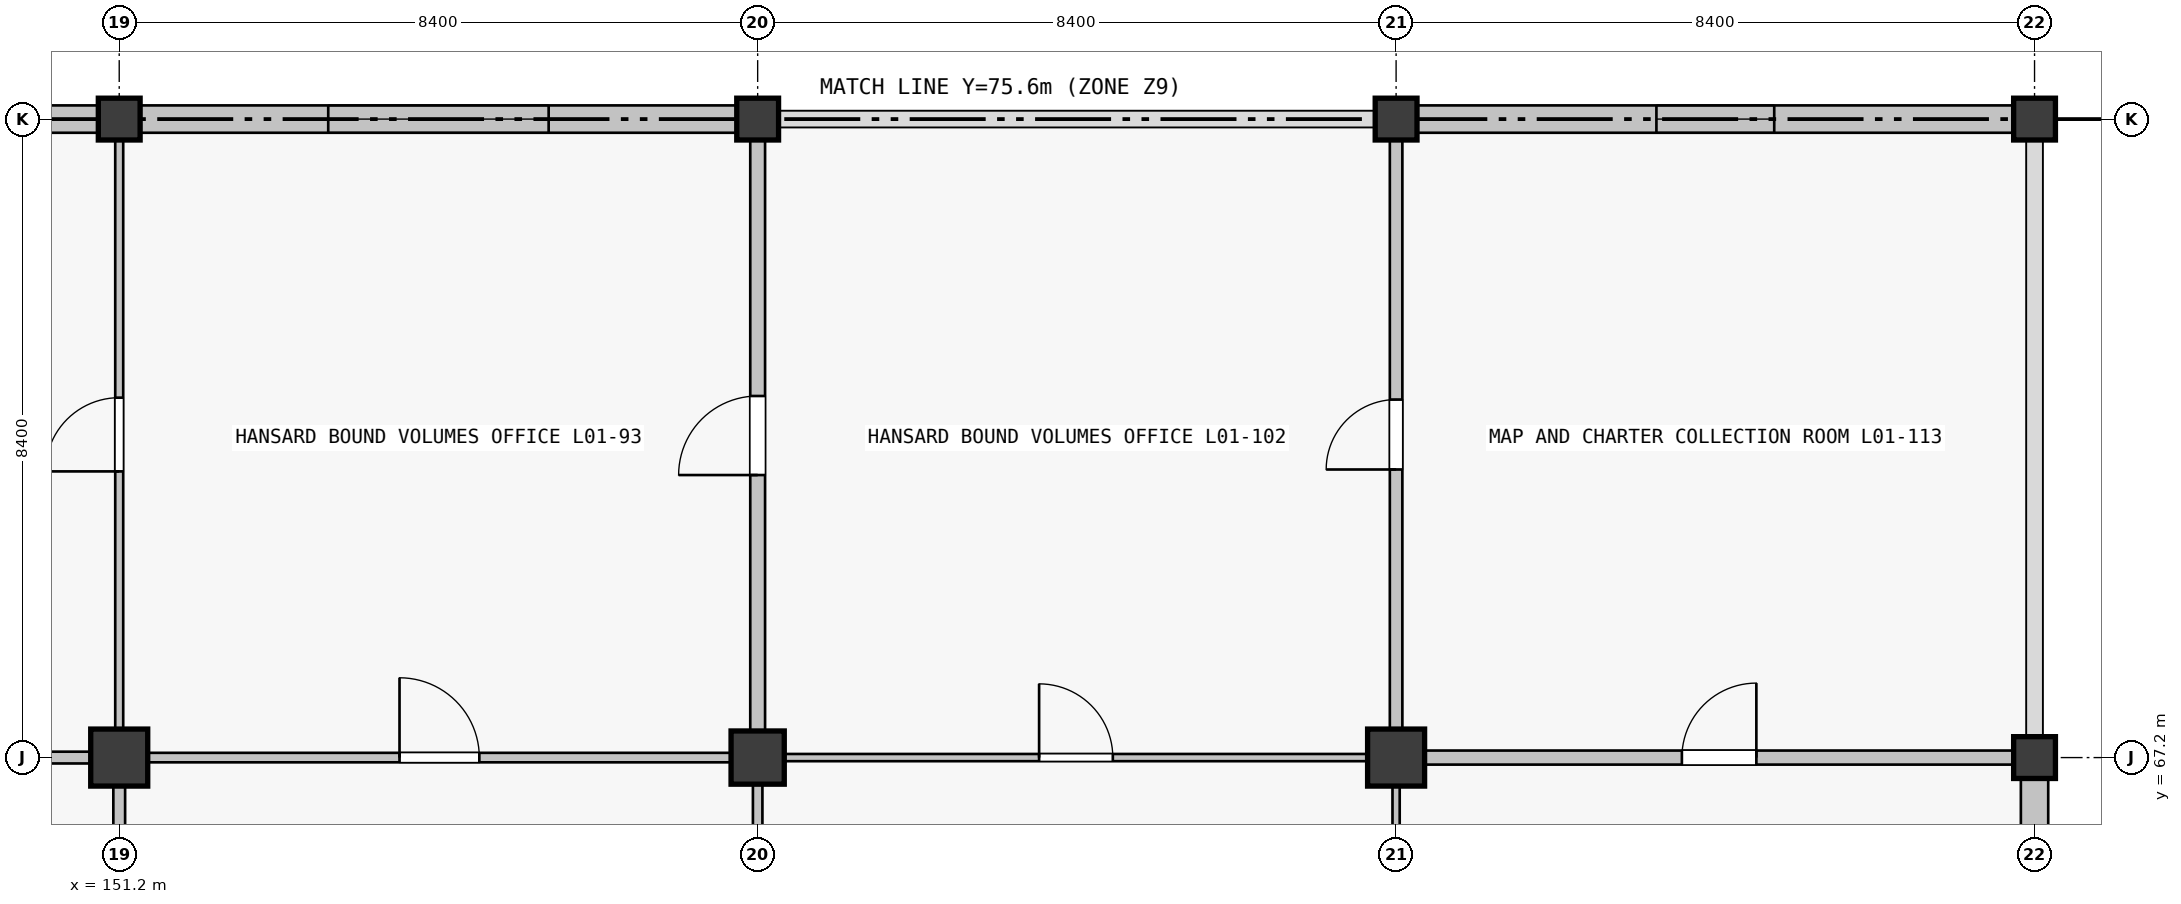
"""IFC4 building model, lengths in metres.
Left out: names, types, materials, properties, quantities, classifications, styles, units other than length and angle.
Written with IfcOpenShell. Run it as: python <this file> out.ifc"""

import sys

from ifc_helpers import new_model, si_unit, direction, frame, frame_2d, origin, origin_2d, place, context, subcontext, project, spatial, rectangle, extrude, element, fill, save


model = new_model("IFC4")
c1 = context("Model", 3, precision=1e-05, world=origin(), true_north=direction((0.0, 1.0)))
c2 = subcontext(c1, "Body", "Model", "MODEL_VIEW")
j1 = project(units=[si_unit("LENGTHUNIT", "METRE"), si_unit("PLANEANGLEUNIT", "RADIAN")], contexts=[c1])
p1 = place(None, origin())
s1 = spatial("IfcSite", under=j1, at=p1, CompositionType="ELEMENT")
p2 = place(p1, origin())
s2 = spatial("IfcBuilding", under=s1, at=p2, CompositionType="ELEMENT")
p3 = place(p2, frame((0.0, 0.0, 5.76)))
s3 = spatial("IfcBuildingStorey", under=s2, at=p3, CompositionType="ELEMENT", Elevation=5.76)
p4 = place(p3, frame((151.2, 67.2, 0.0), z_axis=(0.0, 0.0, 1.0), x_axis=(1.0, 0.0, 0.0)))
e1 = element("IfcColumn", 1, at=p4, inside=s3, PredefinedType="COLUMN", context=c2, shape_type="SweptSolid", body=[
    extrude(rectangle(XDim=0.75, YDim=0.75, at=origin_2d()), origin(), (0.0, 0.0, 1.0), 4.5),
])
p5 = place(p3, frame((151.2, 75.6, 0.0), z_axis=(0.0, 0.0, 1.0), x_axis=(1.0, 0.0, 0.0)))
e2 = element("IfcColumn", 2, at=p5, inside=s3, PredefinedType="COLUMN", context=c2, shape_type="SweptSolid", body=[
    extrude(rectangle(XDim=0.55, YDim=0.55, at=origin_2d()), origin(), (0.0, 0.0, 1.0), 4.2),
])
p6 = place(p3, frame((159.6, 67.2, 0.0), z_axis=(0.0, 0.0, 1.0), x_axis=(1.0, 0.0, 0.0)))
e3 = element("IfcColumn", 3, at=p6, inside=s3, PredefinedType="COLUMN", context=c2, shape_type="SweptSolid", body=[
    extrude(rectangle(XDim=0.7, YDim=0.7, at=origin_2d()), origin(), (0.0, 0.0, 1.0), 4.5),
])
p7 = place(p3, frame((159.6, 75.6, 0.0), z_axis=(0.0, 0.0, 1.0), x_axis=(1.0, 0.0, 0.0)))
e4 = element("IfcColumn", 4, at=p7, inside=s3, PredefinedType="COLUMN", context=c2, shape_type="SweptSolid", body=[
    extrude(rectangle(XDim=0.55, YDim=0.55, at=origin_2d()), origin(), (0.0, 0.0, 1.0), 4.2),
])
p8 = place(p3, frame((168.0, 67.2, 0.0), z_axis=(0.0, 0.0, 1.0), x_axis=(1.0, 0.0, 0.0)))
e5 = element("IfcColumn", 5, at=p8, inside=s3, PredefinedType="COLUMN", context=c2, shape_type="SweptSolid", body=[
    extrude(rectangle(XDim=0.75, YDim=0.75, at=origin_2d()), origin(), (0.0, 0.0, 1.0), 4.5),
])
for number, where, z_axis, x_axis in (
    (6, (168.0, 75.6, 0.0), (0.0, 0.0, 1.0), (1.0, 0.0, 0.0)),
    (7, (176.4, 67.2, 0.0), (0.0, 0.0, 1.0), (1.0, 0.0, 0.0)),
    (8, (176.4, 75.6, 0.0), (0.0, 0.0, 1.0), (1.0, 0.0, 0.0)),
):
    element("IfcColumn", number, at=place(p3, frame(where, z_axis=z_axis, x_axis=x_axis)), inside=s3, PredefinedType="COLUMN", context=c2, shape_type="SweptSolid", body=[
        extrude(rectangle(XDim=0.55, YDim=0.55, at=origin_2d()), origin(), (0.0, 0.0, 1.0), 4.2),
    ])
p9 = place(p3, frame((143.076, 75.6, 0.0), z_axis=(0.0, 0.0, 1.0), x_axis=(1.0, 0.0, 0.0)))
e9 = element("IfcWall", 9, at=p9, inside=s3, PredefinedType="SOLIDWALL", context=c2, shape_type="SweptSolid", body=[
    extrude(rectangle(XDim=7.848, YDim=0.36, at=frame_2d((3.924, 0.0))), origin(), (0.0, 0.0, 1.0), 3.4),
])
p10 = place(p9, frame((2.774, 0.0, 0.9)))
e10 = element("IfcOpeningElement", 10, at=p10, cuts=e9, PredefinedType="OPENING", context=c2, shape_type="SweptSolid", body=[
    extrude(rectangle(XDim=2.3, YDim=1.85, at=frame_2d((1.15, 0.925))), frame((0.0, 0.18, 0.0), z_axis=(0.0, -1.0, 0.0), x_axis=(1.0, 0.0, 0.0)), (0.0, 0.0, 1.0), 0.36),
])
p11 = place(p3, frame((151.476, 75.6, 0.0), z_axis=(0.0, 0.0, 1.0), x_axis=(1.0, 0.0, 0.0)))
e11 = element("IfcWall", 11, at=p11, inside=s3, PredefinedType="SOLIDWALL", context=c2, shape_type="SweptSolid", body=[
    extrude(rectangle(XDim=7.848, YDim=0.36, at=frame_2d((3.924, 0.0))), origin(), (0.0, 0.0, 1.0), 3.4),
])
p12 = place(p11, frame((2.474, 0.0, 0.9)))
e12 = element("IfcOpeningElement", 12, at=p12, cuts=e11, PredefinedType="OPENING", context=c2, shape_type="SweptSolid", body=[
    extrude(rectangle(XDim=2.9, YDim=1.85, at=frame_2d((1.45, 0.925))), frame((0.0, 0.18, 0.0), z_axis=(0.0, -1.0, 0.0), x_axis=(1.0, 0.0, 0.0)), (0.0, 0.0, 1.0), 0.36),
])
p13 = place(p3, frame((176.4, 66.924, 0.0), z_axis=(0.0, 0.0, 1.0), x_axis=(0.0, -1.0, 0.0)))
e13 = element("IfcWall", 13, at=p13, inside=s3, PredefinedType="SOLIDWALL", context=c2, shape_type="SweptSolid", body=[
    extrude(rectangle(XDim=7.848, YDim=0.36, at=frame_2d((3.924, 0.0))), origin(), (0.0, 0.0, 1.0), 3.4),
])
p14 = place(p13, frame((2.549, 0.0, 0.9)))
e14 = element("IfcOpeningElement", 14, at=p14, cuts=e13, PredefinedType="OPENING", context=c2, shape_type="SweptSolid", body=[
    extrude(rectangle(XDim=2.75, YDim=1.6, at=frame_2d((1.375, 0.8))), frame((0.0, 0.18, 0.0), z_axis=(0.0, -1.0, 0.0), x_axis=(1.0, 0.0, 0.0)), (0.0, 0.0, 1.0), 0.36),
])
p15 = place(p3, frame((168.276, 75.6, 0.0), z_axis=(0.0, 0.0, 1.0), x_axis=(1.0, 0.0, 0.0)))
e15 = element("IfcWall", 15, at=p15, inside=s3, PredefinedType="SOLIDWALL", context=c2, shape_type="SweptSolid", body=[
    extrude(rectangle(XDim=7.848, YDim=0.36, at=frame_2d((3.924, 0.0))), origin(), (0.0, 0.0, 1.0), 3.4),
])
p16 = place(p15, frame((3.149, 0.0, 0.9)))
e16 = element("IfcOpeningElement", 16, at=p16, cuts=e15, PredefinedType="OPENING", context=c2, shape_type="SweptSolid", body=[
    extrude(rectangle(XDim=1.55, YDim=1.6, at=frame_2d((0.775, 0.8))), frame((0.0, 0.18, 0.0), z_axis=(0.0, -1.0, 0.0), x_axis=(1.0, 0.0, 0.0)), (0.0, 0.0, 1.0), 0.36),
])
p17 = place(p3, frame((143.152, 67.2, 0.0), z_axis=(0.0, 0.0, 1.0), x_axis=(1.0, 0.0, 0.0)))
e17 = element("IfcWall", 17, at=p17, inside=s3, PredefinedType="PARTITIONING", context=c2, shape_type="SweptSolid", body=[
    extrude(rectangle(XDim=7.671, YDim=0.155, at=frame_2d((3.835, 0.0))), origin(), (0.0, 0.0, 1.0), 2.4),
])
p18 = place(p17, frame((3.336, 0.0, 0.0)))
e18 = element("IfcOpeningElement", 18, at=p18, cuts=e17, PredefinedType="OPENING", context=c2, shape_type="SweptSolid", body=[
    extrude(rectangle(XDim=1.0, YDim=2.2, at=frame_2d((0.5, 1.1))), frame((0.0, 0.078, 0.0), z_axis=(0.0, -1.0, 0.0), x_axis=(1.0, 0.0, 0.0)), (0.0, 0.0, 1.0), 0.155),
])
p19 = place(p3, frame((151.577, 67.2, 0.0), z_axis=(0.0, 0.0, 1.0), x_axis=(1.0, 0.0, 0.0)))
e19 = element("IfcWall", 19, at=p19, inside=s3, PredefinedType="PARTITIONING", context=c2, shape_type="SweptSolid", body=[
    extrude(rectangle(XDim=7.671, YDim=0.125, at=frame_2d((3.835, 0.0))), origin(), (0.0, 0.0, 1.0), 2.4),
])
p20 = place(p19, frame((3.311, 0.0, 0.0)))
e20 = element("IfcOpeningElement", 20, at=p20, cuts=e19, PredefinedType="OPENING", context=c2, shape_type="SweptSolid", body=[
    extrude(rectangle(XDim=1.05, YDim=2.12, at=frame_2d((0.525, 1.06))), frame((0.0, 0.062, 0.0), z_axis=(0.0, -1.0, 0.0), x_axis=(1.0, 0.0, 0.0)), (0.0, 0.0, 1.0), 0.125),
])
p21 = place(p3, frame((159.952, 67.2, 0.0), z_axis=(0.0, 0.0, 1.0), x_axis=(1.0, 0.0, 0.0)))
e21 = element("IfcWall", 21, at=p21, inside=s3, PredefinedType="PARTITIONING", context=c2, shape_type="SweptSolid", body=[
    extrude(rectangle(XDim=7.671, YDim=0.095, at=frame_2d((3.835, 0.0))), origin(), (0.0, 0.0, 1.0), 2.4),
])
p22 = place(p21, frame((3.351, 0.0, 0.0)))
e22 = element("IfcOpeningElement", 22, at=p22, cuts=e21, PredefinedType="OPENING", context=c2, shape_type="SweptSolid", body=[
    extrude(rectangle(XDim=0.97, YDim=2.12, at=frame_2d((0.485, 1.06))), frame((0.0, 0.047, 0.0), z_axis=(0.0, -1.0, 0.0), x_axis=(1.0, 0.0, 0.0)), (0.0, 0.0, 1.0), 0.095),
])
p23 = place(p3, frame((168.377, 67.2, 0.0), z_axis=(0.0, 0.0, 1.0), x_axis=(1.0, 0.0, 0.0)))
e23 = element("IfcWall", 23, at=p23, inside=s3, PredefinedType="PARTITIONING", context=c2, shape_type="SweptSolid", body=[
    extrude(rectangle(XDim=7.746, YDim=0.185, at=frame_2d((3.873, 0.0))), origin(), (0.0, 0.0, 1.0), 2.4),
])
p24 = place(p23, frame((3.383, 0.0, 0.0)))
e24 = element("IfcOpeningElement", 24, at=p24, cuts=e23, PredefinedType="OPENING", context=c2, shape_type="SweptSolid", body=[
    extrude(rectangle(XDim=0.98, YDim=2.18, at=frame_2d((0.49, 1.09))), frame((0.0, 0.093, 0.0), z_axis=(0.0, -1.0, 0.0), x_axis=(1.0, 0.0, 0.0)), (0.0, 0.0, 1.0), 0.185),
])
p25 = place(p3, frame((151.2, 59.152, 0.0), z_axis=(0.0, 0.0, 1.0), x_axis=(0.0, 1.0, 0.0)))
e25 = element("IfcWall", 25, at=p25, inside=s3, PredefinedType="PARTITIONING", context=c2, shape_type="SweptSolid", body=[
    extrude(rectangle(XDim=7.671, YDim=0.155, at=frame_2d((3.835, 0.0))), origin(), (0.0, 0.0, 1.0), 2.4),
])
p26 = place(p25, frame((3.331, 0.0, 0.0)))
e26 = element("IfcOpeningElement", 26, at=p26, cuts=e25, PredefinedType="OPENING", context=c2, shape_type="SweptSolid", body=[
    extrude(rectangle(XDim=1.01, YDim=2.12, at=frame_2d((0.505, 1.06))), frame((0.0, 0.078, 0.0), z_axis=(0.0, -1.0, 0.0), x_axis=(1.0, 0.0, 0.0)), (0.0, 0.0, 1.0), 0.155),
])
p27 = place(p3, frame((151.2, 67.577, 0.0), z_axis=(0.0, 0.0, 1.0), x_axis=(0.0, 1.0, 0.0)))
e27 = element("IfcWall", 27, at=p27, inside=s3, PredefinedType="PARTITIONING", context=c2, shape_type="SweptSolid", body=[
    extrude(rectangle(XDim=7.746, YDim=0.105, at=frame_2d((3.873, 0.0))), origin(), (0.0, 0.0, 1.0), 2.4),
])
p28 = place(p27, frame((3.388, 0.0, 0.0)))
e28 = element("IfcOpeningElement", 28, at=p28, cuts=e27, PredefinedType="OPENING", context=c2, shape_type="SweptSolid", body=[
    extrude(rectangle(XDim=0.97, YDim=2.12, at=frame_2d((0.485, 1.06))), frame((0.0, 0.052, 0.0), z_axis=(0.0, -1.0, 0.0), x_axis=(1.0, 0.0, 0.0)), (0.0, 0.0, 1.0), 0.105),
])
p29 = place(p3, frame((159.6, 59.177, 0.0), z_axis=(0.0, 0.0, 1.0), x_axis=(0.0, 1.0, 0.0)))
e29 = element("IfcWall", 29, at=p29, inside=s3, PredefinedType="PARTITIONING", context=c2, shape_type="SweptSolid", body=[
    extrude(rectangle(XDim=7.671, YDim=0.125, at=frame_2d((3.835, 0.0))), origin(), (0.0, 0.0, 1.0), 2.4),
])
p30 = place(p29, frame((3.331, 0.0, 0.0)))
e30 = element("IfcOpeningElement", 30, at=p30, cuts=e29, PredefinedType="OPENING", context=c2, shape_type="SweptSolid", body=[
    extrude(rectangle(XDim=1.01, YDim=2.12, at=frame_2d((0.505, 1.06))), frame((0.0, 0.062, 0.0), z_axis=(0.0, -1.0, 0.0), x_axis=(1.0, 0.0, 0.0)), (0.0, 0.0, 1.0), 0.125),
])
p31 = place(p3, frame((159.6, 67.552, 0.0), z_axis=(0.0, 0.0, 1.0), x_axis=(0.0, 1.0, 0.0)))
e31 = element("IfcWall", 31, at=p31, inside=s3, PredefinedType="PARTITIONING", context=c2, shape_type="SweptSolid", body=[
    extrude(rectangle(XDim=7.771, YDim=0.195, at=frame_2d((3.885, 0.0))), origin(), (0.0, 0.0, 1.0), 2.4),
])
p32 = place(p31, frame((3.365, 0.0, 0.0)))
e32 = element("IfcOpeningElement", 32, at=p32, cuts=e31, PredefinedType="OPENING", context=c2, shape_type="SweptSolid", body=[
    extrude(rectangle(XDim=1.04, YDim=2.2, at=frame_2d((0.52, 1.1))), frame((0.0, 0.098, 0.0), z_axis=(0.0, -1.0, 0.0), x_axis=(1.0, 0.0, 0.0)), (0.0, 0.0, 1.0), 0.195),
])
p33 = place(p3, frame((168.0, 59.152, 0.0), z_axis=(0.0, 0.0, 1.0), x_axis=(0.0, 1.0, 0.0)))
e33 = element("IfcWall", 33, at=p33, inside=s3, PredefinedType="PARTITIONING", context=c2, shape_type="SweptSolid", body=[
    extrude(rectangle(XDim=7.671, YDim=0.095, at=frame_2d((3.835, 0.0))), origin(), (0.0, 0.0, 1.0), 2.4),
])
p34 = place(p33, frame((3.365, 0.0, 0.0)))
e34 = element("IfcOpeningElement", 34, at=p34, cuts=e33, PredefinedType="OPENING", context=c2, shape_type="SweptSolid", body=[
    extrude(rectangle(XDim=0.94, YDim=2.15, at=frame_2d((0.47, 1.075))), frame((0.0, 0.047, 0.0), z_axis=(0.0, -1.0, 0.0), x_axis=(1.0, 0.0, 0.0)), (0.0, 0.0, 1.0), 0.095),
])
p35 = place(p3, frame((168.0, 67.577, 0.0), z_axis=(0.0, 0.0, 1.0), x_axis=(0.0, 1.0, 0.0)))
e35 = element("IfcWall", 35, at=p35, inside=s3, PredefinedType="PARTITIONING", context=c2, shape_type="SweptSolid", body=[
    extrude(rectangle(XDim=7.746, YDim=0.165, at=frame_2d((3.873, 0.0))), origin(), (0.0, 0.0, 1.0), 2.4),
])
p36 = place(p35, frame((3.413, 0.0, 0.0)))
e36 = element("IfcOpeningElement", 36, at=p36, cuts=e35, PredefinedType="OPENING", context=c2, shape_type="SweptSolid", body=[
    extrude(rectangle(XDim=0.92, YDim=2.15, at=frame_2d((0.46, 1.075))), frame((0.0, 0.083, 0.0), z_axis=(0.0, -1.0, 0.0), x_axis=(1.0, 0.0, 0.0)), (0.0, 0.0, 1.0), 0.165),
])
p37 = place(p12, origin())
e37 = element("IfcWindow", 37, at=p37, inside=s3, PartitioningType="SINGLE_PANEL", PredefinedType="WINDOW", context=c2, shape_type="SweptSolid", body=[
    extrude(rectangle(XDim=2.9, YDim=1.85, at=frame_2d((1.45, 0.925))), frame((0.0, 0.03, 0.0), z_axis=(0.0, -1.0, 0.0), x_axis=(1.0, 0.0, 0.0)), (0.0, 0.0, 1.0), 0.06),
])
fill(e12, e37)
p38 = place(p16, origin())
e38 = element("IfcWindow", 38, at=p38, inside=s3, PartitioningType="SINGLE_PANEL", PredefinedType="WINDOW", context=c2, shape_type="SweptSolid", body=[
    extrude(rectangle(XDim=1.55, YDim=1.6, at=frame_2d((0.775, 0.8))), frame((0.0, 0.03, 0.0), z_axis=(0.0, -1.0, 0.0), x_axis=(1.0, 0.0, 0.0)), (0.0, 0.0, 1.0), 0.06),
])
fill(e16, e38)
p39 = place(p20, origin())
e39 = element("IfcDoor", 39, at=p39, inside=s3, OperationType="SINGLE_SWING_LEFT", PredefinedType="DOOR", context=c2, shape_type="SweptSolid", body=[
    extrude(rectangle(XDim=1.05, YDim=2.12, at=frame_2d((0.525, 1.06))), frame((0.0, 0.025, 0.0), z_axis=(0.0, -1.0, 0.0), x_axis=(1.0, 0.0, 0.0)), (0.0, 0.0, 1.0), 0.05),
])
fill(e20, e39)
p40 = place(p22, origin())
e40 = element("IfcDoor", 40, at=p40, inside=s3, OperationType="SINGLE_SWING_LEFT", PredefinedType="DOOR", context=c2, shape_type="SweptSolid", body=[
    extrude(rectangle(XDim=0.97, YDim=2.12, at=frame_2d((0.485, 1.06))), frame((0.0, 0.025, 0.0), z_axis=(0.0, -1.0, 0.0), x_axis=(1.0, 0.0, 0.0)), (0.0, 0.0, 1.0), 0.05),
])
fill(e22, e40)
p41 = place(p24, origin())
e41 = element("IfcDoor", 41, at=p41, inside=s3, OperationType="SINGLE_SWING_RIGHT", PredefinedType="DOOR", context=c2, shape_type="SweptSolid", body=[
    extrude(rectangle(XDim=0.98, YDim=2.18, at=frame_2d((0.49, 1.09))), frame((0.0, 0.025, 0.0), z_axis=(0.0, -1.0, 0.0), x_axis=(1.0, 0.0, 0.0)), (0.0, 0.0, 1.0), 0.05),
])
fill(e24, e41)
p42 = place(p28, origin())
e42 = element("IfcDoor", 42, at=p42, inside=s3, OperationType="SINGLE_SWING_LEFT", PredefinedType="DOOR", context=c2, shape_type="SweptSolid", body=[
    extrude(rectangle(XDim=0.97, YDim=2.12, at=frame_2d((0.485, 1.06))), frame((0.0, 0.025, 0.0), z_axis=(0.0, -1.0, 0.0), x_axis=(1.0, 0.0, 0.0)), (0.0, 0.0, 1.0), 0.05),
])
fill(e28, e42)
p43 = place(p32, origin())
e43 = element("IfcDoor", 43, at=p43, inside=s3, OperationType="SINGLE_SWING_LEFT", PredefinedType="DOOR", context=c2, shape_type="SweptSolid", body=[
    extrude(rectangle(XDim=1.04, YDim=2.2, at=frame_2d((0.52, 1.1))), frame((0.0, 0.025, 0.0), z_axis=(0.0, -1.0, 0.0), x_axis=(1.0, 0.0, 0.0)), (0.0, 0.0, 1.0), 0.05),
])
fill(e32, e43)
p44 = place(p36, origin())
e44 = element("IfcDoor", 44, at=p44, inside=s3, OperationType="SINGLE_SWING_LEFT", PredefinedType="DOOR", context=c2, shape_type="SweptSolid", body=[
    extrude(rectangle(XDim=0.92, YDim=2.15, at=frame_2d((0.46, 1.075))), frame((0.0, 0.025, 0.0), z_axis=(0.0, -1.0, 0.0), x_axis=(1.0, 0.0, 0.0)), (0.0, 0.0, 1.0), 0.05),
])
fill(e36, e44)
save(model, sys.argv[1])
